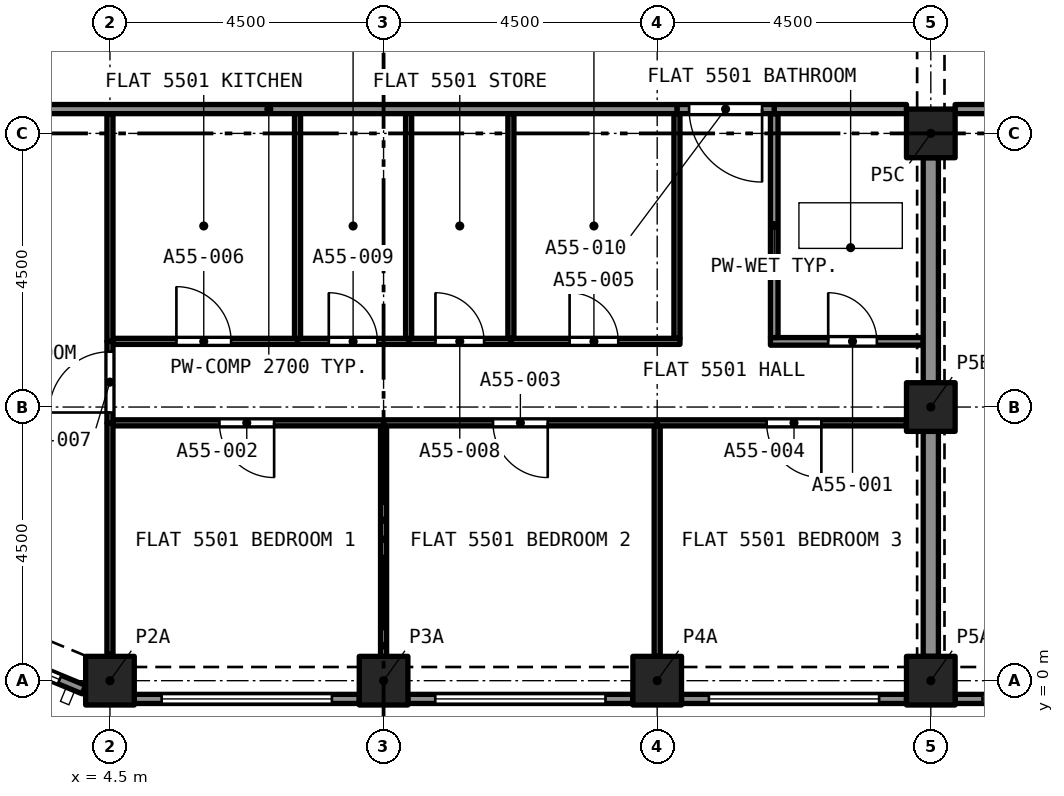
"""IFC4 building model, lengths in metres.
Left out: names, types, materials, properties, quantities, classifications, styles, units other than length and angle.
Written with IfcOpenShell. Run it as: python <this file> out.ifc"""

import sys

from ifc_helpers import new_model, si_unit, direction, frame, frame_2d, origin, origin_2d, place, context, subcontext, project, spatial, rectangle, extrude, element, fill, save


model = new_model("IFC4")
c1 = context("Model", 3, precision=1e-05, world=origin(), true_north=direction((0.0, 1.0)))
c2 = subcontext(c1, "Body", "Model", "MODEL_VIEW")
j1 = project(units=[si_unit("LENGTHUNIT", "METRE"), si_unit("PLANEANGLEUNIT", "RADIAN")], contexts=[c1])
p1 = place(None, origin())
s1 = spatial("IfcSite", under=j1, at=p1, CompositionType="ELEMENT")
p2 = place(p1, origin())
s2 = spatial("IfcBuilding", under=s1, at=p2, CompositionType="ELEMENT")
p3 = place(p2, frame((0.0, 0.0, 198.7)))
s3 = spatial("IfcBuildingStorey", under=s2, at=p3, CompositionType="ELEMENT", Elevation=198.7)
for number, where, z_axis, x_axis in (
    (1, (4.5, 0.0, 0.0), (0.0, 0.0, 1.0), (1.0, 0.0, 0.0)),
    (2, (9.0, 0.0, 0.0), (0.0, 0.0, 1.0), (1.0, 0.0, 0.0)),
    (3, (13.5, 0.0, 0.0), (0.0, 0.0, 1.0), (1.0, 0.0, 0.0)),
    (4, (18.0, 0.0, 0.0), (0.0, 0.0, 1.0), (1.0, 0.0, 0.0)),
    (5, (18.0, 4.5, 0.0), (0.0, 0.0, 1.0), (1.0, 0.0, 0.0)),
    (6, (18.0, 9.0, 0.0), (0.0, 0.0, 1.0), (1.0, 0.0, 0.0)),
):
    element("IfcColumn", number, at=place(p3, frame(where, z_axis=z_axis, x_axis=x_axis)), inside=s3, PredefinedType="COLUMN", context=c2, shape_type="SweptSolid", body=[
        extrude(rectangle(XDim=0.8, YDim=0.8, at=origin_2d()), origin(), (0.0, 0.0, 1.0), 3.2),
    ])
p4 = place(p3, frame((4.071, -0.147, 0.0), z_axis=(0.0, 0.0, 1.0), x_axis=(-0.923885342263, 0.382669406082, 0.0)))
e7 = element("IfcWall", 7, at=p4, inside=s3, PredefinedType="SOLIDWALL", context=c2, shape_type="SweptSolid", body=[
    extrude(rectangle(XDim=2.602, YDim=0.15, at=frame_2d((1.301, 0.0))), origin(), (0.0, 0.0, 1.0), 3.2),
])
p5 = place(p4, frame((0.432, 0.0, 0.45)))
e8 = element("IfcOpeningElement", 8, at=p5, cuts=e7, PredefinedType="OPENING", context=c2, shape_type="SweptSolid", body=[
    extrude(rectangle(XDim=1.9, YDim=1.95, at=frame_2d((0.95, 0.975))), frame((0.0, 0.085, 0.0), z_axis=(0.0, -1.0, 0.0), x_axis=(1.0, 0.0, 0.0)), (0.0, 0.0, 1.0), 0.17),
])
p6 = place(p3, frame((8.6, -0.3, 0.0), z_axis=(0.0, 0.0, 1.0), x_axis=(-1.0, 0.0, 0.0)))
e9 = element("IfcWall", 9, at=p6, inside=s3, PredefinedType="SOLIDWALL", context=c2, shape_type="SweptSolid", body=[
    extrude(rectangle(XDim=3.7, YDim=0.15, at=frame_2d((1.85, 0.0))), origin(), (0.0, 0.0, 1.0), 3.2),
])
p7 = place(p6, frame((0.45, 0.0, 0.45)))
e10 = element("IfcOpeningElement", 10, at=p7, cuts=e9, PredefinedType="OPENING", context=c2, shape_type="SweptSolid", body=[
    extrude(rectangle(XDim=2.8, YDim=1.95, at=frame_2d((1.4, 0.975))), frame((0.0, 0.085, 0.0), z_axis=(0.0, -1.0, 0.0), x_axis=(1.0, 0.0, 0.0)), (0.0, 0.0, 1.0), 0.17),
])
p8 = place(p3, frame((13.1, -0.3, 0.0), z_axis=(0.0, 0.0, 1.0), x_axis=(-1.0, 0.0, 0.0)))
e11 = element("IfcWall", 11, at=p8, inside=s3, PredefinedType="SOLIDWALL", context=c2, shape_type="SweptSolid", body=[
    extrude(rectangle(XDim=3.7, YDim=0.15, at=frame_2d((1.85, 0.0))), origin(), (0.0, 0.0, 1.0), 3.2),
])
p9 = place(p8, frame((0.45, 0.0, 0.45)))
e12 = element("IfcOpeningElement", 12, at=p9, cuts=e11, PredefinedType="OPENING", context=c2, shape_type="SweptSolid", body=[
    extrude(rectangle(XDim=2.8, YDim=1.95, at=frame_2d((1.4, 0.975))), frame((0.0, 0.085, 0.0), z_axis=(0.0, -1.0, 0.0), x_axis=(1.0, 0.0, 0.0)), (0.0, 0.0, 1.0), 0.17),
])
p10 = place(p3, frame((17.6, -0.3, 0.0), z_axis=(0.0, 0.0, 1.0), x_axis=(-1.0, 0.0, 0.0)))
e13 = element("IfcWall", 13, at=p10, inside=s3, PredefinedType="SOLIDWALL", context=c2, shape_type="SweptSolid", body=[
    extrude(rectangle(XDim=3.7, YDim=0.15, at=frame_2d((1.85, 0.0))), origin(), (0.0, 0.0, 1.0), 3.2),
])
p11 = place(p10, frame((0.45, 0.0, 0.45)))
e14 = element("IfcOpeningElement", 14, at=p11, cuts=e13, PredefinedType="OPENING", context=c2, shape_type="SweptSolid", body=[
    extrude(rectangle(XDim=2.8, YDim=1.95, at=frame_2d((1.4, 0.975))), frame((0.0, 0.085, 0.0), z_axis=(0.0, -1.0, 0.0), x_axis=(1.0, 0.0, 0.0)), (0.0, 0.0, 1.0), 0.17),
])
p12 = place(p3, frame((22.1, -0.3, 0.0), z_axis=(0.0, 0.0, 1.0), x_axis=(-1.0, 0.0, 0.0)))
e15 = element("IfcWall", 15, at=p12, inside=s3, PredefinedType="SOLIDWALL", context=c2, shape_type="SweptSolid", body=[
    extrude(rectangle(XDim=3.7, YDim=0.15, at=frame_2d((1.85, 0.0))), origin(), (0.0, 0.0, 1.0), 3.2),
])
p13 = place(p12, frame((0.45, 0.0, 0.45)))
e16 = element("IfcOpeningElement", 16, at=p13, cuts=e15, PredefinedType="OPENING", context=c2, shape_type="SweptSolid", body=[
    extrude(rectangle(XDim=2.8, YDim=1.95, at=frame_2d((1.4, 0.975))), frame((0.0, 0.085, 0.0), z_axis=(0.0, -1.0, 0.0), x_axis=(1.0, 0.0, 0.0)), (0.0, 0.0, 1.0), 0.17),
])
p14 = place(p3, frame((15.363, 5.58, 0.0), z_axis=(0.0, 0.0, 1.0), x_axis=(1.0, 0.0, 0.0)))
e17 = element("IfcWall", 17, at=p14, inside=s3, PredefinedType="PARTITIONING", context=c2, shape_type="SweptSolid", body=[
    extrude(rectangle(XDim=2.512, YDim=0.125, at=frame_2d((1.256, 0.0))), origin(), (0.0, 0.0, 1.0), 2.7),
])
p15 = place(p14, frame((0.95, 0.0, 0.0)))
e18 = element("IfcOpeningElement", 18, at=p15, cuts=e17, PredefinedType="OPENING", context=c2, shape_type="SweptSolid", body=[
    extrude(rectangle(XDim=0.8, YDim=2.1, at=frame_2d((0.4, 1.05))), frame((0.0, 0.073, 0.0), z_axis=(0.0, -1.0, 0.0), x_axis=(1.0, 0.0, 0.0)), (0.0, 0.0, 1.0), 0.145),
])
p16 = place(p3, frame((15.425, 5.643, 0.0), z_axis=(0.0, 0.0, 1.0), x_axis=(0.0, 1.0, 0.0)))
e19 = element("IfcWall", 19, at=p16, inside=s3, PredefinedType="PARTITIONING", context=c2, shape_type="SweptSolid", body=[
    extrude(rectangle(XDim=3.682, YDim=0.125, at=frame_2d((1.841, 0.0))), origin(), (0.0, 0.0, 1.0), 2.7),
])
p17 = place(p3, frame((15.425, 9.4, 0.0), z_axis=(0.0, 0.0, 1.0), x_axis=(1.0, 0.0, 0.0)))
e20 = element("IfcWall", 20, at=p17, inside=s3, PredefinedType="PARTITIONING", context=c2, shape_type="SweptSolid", body=[
    extrude(rectangle(XDim=2.175, YDim=0.15, at=frame_2d((1.087, 0.0))), origin(), (0.0, 0.0, 1.0), 2.7),
])
p18 = place(p3, frame((9.0, 0.4, 0.0), z_axis=(0.0, 0.0, 1.0), x_axis=(0.0, 1.0, 0.0)))
e21 = element("IfcWall", 21, at=p18, inside=s3, PredefinedType="PARTITIONING", context=c2, shape_type="SweptSolid", body=[
    extrude(rectangle(XDim=3.79, YDim=0.1, at=frame_2d((1.895, 0.0))), origin(), (0.0, 0.0, 1.0), 2.7),
])
p19 = place(p3, frame((9.0, 4.24, 0.0), z_axis=(0.0, 0.0, 1.0), x_axis=(-1.0, 0.0, 0.0)))
e22 = element("IfcWall", 22, at=p19, inside=s3, PredefinedType="PARTITIONING", context=c2, shape_type="SweptSolid", body=[
    extrude(rectangle(XDim=4.45, YDim=0.1, at=frame_2d((2.225, 0.0))), origin(), (0.0, 0.0, 1.0), 2.7),
])
p20 = place(p19, frame((1.8, 0.0, 0.0)))
e23 = element("IfcOpeningElement", 23, at=p20, cuts=e22, PredefinedType="OPENING", context=c2, shape_type="SweptSolid", body=[
    extrude(rectangle(XDim=0.9, YDim=2.1, at=frame_2d((0.45, 1.05))), frame((0.0, 0.06, 0.0), z_axis=(0.0, -1.0, 0.0), x_axis=(1.0, 0.0, 0.0)), (0.0, 0.0, 1.0), 0.12),
])
p21 = place(p3, frame((4.5, 0.433, 0.0), z_axis=(0.0, 0.0, 1.0), x_axis=(0.0, 1.0, 0.0)))
e24 = element("IfcWall", 24, at=p21, inside=s3, PredefinedType="PARTITIONING", context=c2, shape_type="SweptSolid", body=[
    extrude(rectangle(XDim=3.807, YDim=0.1, at=frame_2d((1.904, 0.0))), origin(), (0.0, 0.0, 1.0), 2.7),
])
p22 = place(p3, frame((13.5, 0.4, 0.0), z_axis=(0.0, 0.0, 1.0), x_axis=(0.0, 1.0, 0.0)))
e25 = element("IfcWall", 25, at=p22, inside=s3, PredefinedType="PARTITIONING", context=c2, shape_type="SweptSolid", body=[
    extrude(rectangle(XDim=3.79, YDim=0.1, at=frame_2d((1.895, 0.0))), origin(), (0.0, 0.0, 1.0), 2.7),
])
p23 = place(p3, frame((13.5, 4.24, 0.0), z_axis=(0.0, 0.0, 1.0), x_axis=(-1.0, 0.0, 0.0)))
e26 = element("IfcWall", 26, at=p23, inside=s3, PredefinedType="PARTITIONING", context=c2, shape_type="SweptSolid", body=[
    extrude(rectangle(XDim=4.5, YDim=0.1, at=frame_2d((2.25, 0.0))), origin(), (0.0, 0.0, 1.0), 2.7),
])
p24 = place(p23, frame((1.8, 0.0, 0.0)))
e27 = element("IfcOpeningElement", 27, at=p24, cuts=e26, PredefinedType="OPENING", context=c2, shape_type="SweptSolid", body=[
    extrude(rectangle(XDim=0.9, YDim=2.1, at=frame_2d((0.45, 1.05))), frame((0.0, 0.06, 0.0), z_axis=(0.0, -1.0, 0.0), x_axis=(1.0, 0.0, 0.0)), (0.0, 0.0, 1.0), 0.12),
])
p25 = place(p3, frame((17.6, 4.24, 0.0), z_axis=(0.0, 0.0, 1.0), x_axis=(-1.0, 0.0, 0.0)))
e28 = element("IfcWall", 28, at=p25, inside=s3, PredefinedType="PARTITIONING", context=c2, shape_type="SweptSolid", body=[
    extrude(rectangle(XDim=4.1, YDim=0.1, at=frame_2d((2.05, 0.0))), origin(), (0.0, 0.0, 1.0), 2.7),
])
p26 = place(p25, frame((1.4, 0.0, 0.0)))
e29 = element("IfcOpeningElement", 29, at=p26, cuts=e28, PredefinedType="OPENING", context=c2, shape_type="SweptSolid", body=[
    extrude(rectangle(XDim=0.9, YDim=2.1, at=frame_2d((0.45, 1.05))), frame((0.0, 0.06, 0.0), z_axis=(0.0, -1.0, 0.0), x_axis=(1.0, 0.0, 0.0)), (0.0, 0.0, 1.0), 0.12),
])
p27 = place(p3, frame((18.0, 0.4, 0.0), z_axis=(0.0, 0.0, 1.0), x_axis=(0.0, 1.0, 0.0)))
e30 = element("IfcWall", 30, at=p27, inside=s3, PredefinedType="PARTITIONING", context=c2, shape_type="SweptSolid", body=[
    extrude(rectangle(XDim=3.7, YDim=0.25, at=frame_2d((1.85, 0.0))), origin(), (0.0, 0.0, 1.0), 2.38),
])
p28 = place(p3, frame((13.825, 5.63, 0.0), z_axis=(0.0, 0.0, 1.0), x_axis=(0.0, 1.0, 0.0)))
e31 = element("IfcWall", 31, at=p28, inside=s3, PredefinedType="PARTITIONING", context=c2, shape_type="SweptSolid", body=[
    extrude(rectangle(XDim=3.695, YDim=0.1, at=frame_2d((1.848, 0.0))), origin(), (0.0, 0.0, 1.0), 2.7),
])
p29 = place(p3, frame((11.094, 5.58, 0.0), z_axis=(0.0, 0.0, 1.0), x_axis=(1.0, 0.0, 0.0)))
e32 = element("IfcWall", 32, at=p29, inside=s3, PredefinedType="PARTITIONING", context=c2, shape_type="SweptSolid", body=[
    extrude(rectangle(XDim=2.781, YDim=0.1, at=frame_2d((1.391, 0.0))), origin(), (0.0, 0.0, 1.0), 2.7),
])
p30 = place(p29, frame((0.966, 0.0, 0.0)))
e33 = element("IfcOpeningElement", 33, at=p30, cuts=e32, PredefinedType="OPENING", context=c2, shape_type="SweptSolid", body=[
    extrude(rectangle(XDim=0.8, YDim=2.1, at=frame_2d((0.4, 1.05))), frame((0.0, 0.06, 0.0), z_axis=(0.0, -1.0, 0.0), x_axis=(1.0, 0.0, 0.0)), (0.0, 0.0, 1.0), 0.12),
])
p31 = place(p3, frame((11.094, 5.63, 0.0), z_axis=(0.0, 0.0, 1.0), x_axis=(0.0, 1.0, 0.0)))
e34 = element("IfcWall", 34, at=p31, inside=s3, PredefinedType="PARTITIONING", context=c2, shape_type="SweptSolid", body=[
    extrude(rectangle(XDim=3.695, YDim=0.1, at=frame_2d((1.848, 0.0))), origin(), (0.0, 0.0, 1.0), 2.7),
])
p32 = place(p3, frame((4.55, 5.58, 0.0), z_axis=(0.0, 0.0, 1.0), x_axis=(1.0, 0.0, 0.0)))
e35 = element("IfcWall", 35, at=p32, inside=s3, PredefinedType="PARTITIONING", context=c2, shape_type="SweptSolid", body=[
    extrude(rectangle(XDim=3.035, YDim=0.1, at=frame_2d((1.518, 0.0))), origin(), (0.0, 0.0, 1.0), 2.7),
])
p33 = place(p32, frame((1.043, 0.0, 0.0)))
e36 = element("IfcOpeningElement", 36, at=p33, cuts=e35, PredefinedType="OPENING", context=c2, shape_type="SweptSolid", body=[
    extrude(rectangle(XDim=0.9, YDim=2.1, at=frame_2d((0.45, 1.05))), frame((0.0, 0.06, 0.0), z_axis=(0.0, -1.0, 0.0), x_axis=(1.0, 0.0, 0.0)), (0.0, 0.0, 1.0), 0.12),
])
p34 = place(p3, frame((4.5, 4.24, 0.0), z_axis=(0.0, 0.0, 1.0), x_axis=(0.0, 1.0, 0.0)))
e37 = element("IfcWall", 37, at=p34, inside=s3, PredefinedType="PARTITIONING", context=c2, shape_type="SweptSolid", body=[
    extrude(rectangle(XDim=1.34, YDim=0.1, at=frame_2d((0.67, 0.0))), origin(), (0.0, 0.0, 1.0), 2.7),
])
p35 = place(p34, frame((0.17, 0.0, 0.0)))
e38 = element("IfcOpeningElement", 38, at=p35, cuts=e37, PredefinedType="OPENING", context=c2, shape_type="SweptSolid", body=[
    extrude(rectangle(XDim=1.0, YDim=2.1, at=frame_2d((0.5, 1.05))), frame((0.0, 0.06, 0.0), z_axis=(0.0, -1.0, 0.0), x_axis=(1.0, 0.0, 0.0)), (0.0, 0.0, 1.0), 0.12),
])
p36 = place(p3, frame((9.412, 5.58, 0.0), z_axis=(0.0, 0.0, 1.0), x_axis=(1.0, 0.0, 0.0)))
e39 = element("IfcWall", 39, at=p36, inside=s3, PredefinedType="PARTITIONING", context=c2, shape_type="SweptSolid", body=[
    extrude(rectangle(XDim=1.682, YDim=0.1, at=frame_2d((0.841, 0.0))), origin(), (0.0, 0.0, 1.0), 2.7),
])
p37 = place(p36, frame((0.441, 0.0, 0.0)))
e40 = element("IfcOpeningElement", 40, at=p37, cuts=e39, PredefinedType="OPENING", context=c2, shape_type="SweptSolid", body=[
    extrude(rectangle(XDim=0.8, YDim=2.1, at=frame_2d((0.4, 1.05))), frame((0.0, 0.06, 0.0), z_axis=(0.0, -1.0, 0.0), x_axis=(1.0, 0.0, 0.0)), (0.0, 0.0, 1.0), 0.12),
])
p38 = place(p3, frame((7.585, 5.58, 0.0), z_axis=(0.0, 0.0, 1.0), x_axis=(1.0, 0.0, 0.0)))
e41 = element("IfcWall", 41, at=p38, inside=s3, PredefinedType="PARTITIONING", context=c2, shape_type="SweptSolid", body=[
    extrude(rectangle(XDim=1.827, YDim=0.1, at=frame_2d((0.914, 0.0))), origin(), (0.0, 0.0, 1.0), 2.7),
])
p39 = place(p38, frame((0.513, 0.0, 0.0)))
e42 = element("IfcOpeningElement", 42, at=p39, cuts=e41, PredefinedType="OPENING", context=c2, shape_type="SweptSolid", body=[
    extrude(rectangle(XDim=0.8, YDim=2.1, at=frame_2d((0.4, 1.05))), frame((0.0, 0.06, 0.0), z_axis=(0.0, -1.0, 0.0), x_axis=(1.0, 0.0, 0.0)), (0.0, 0.0, 1.0), 0.12),
])
p40 = place(p3, frame((18.0, 4.9, 0.0), z_axis=(0.0, 0.0, 1.0), x_axis=(0.0, 1.0, 0.0)))
e43 = element("IfcWall", 43, at=p40, inside=s3, PredefinedType="PARTITIONING", context=c2, shape_type="SweptSolid", body=[
    extrude(rectangle(XDim=3.7, YDim=0.25, at=frame_2d((1.85, 0.0))), origin(), (0.0, 0.0, 1.0), 2.38),
])
p41 = place(p3, frame((15.425, 9.4, 0.0), z_axis=(0.0, 0.0, 1.0), x_axis=(-1.0, 0.0, 0.0)))
e44 = element("IfcWall", 44, at=p41, inside=s3, PredefinedType="PARTITIONING", context=c2, shape_type="SweptSolid", body=[
    extrude(rectangle(XDim=1.6, YDim=0.15, at=frame_2d((0.8, 0.0))), origin(), (0.0, 0.0, 1.0), 2.7),
])
p42 = place(p41, frame((0.2, 0.0, 0.0)))
e45 = element("IfcOpeningElement", 45, at=p42, cuts=e44, PredefinedType="OPENING", context=c2, shape_type="SweptSolid", body=[
    extrude(rectangle(XDim=1.2, YDim=2.4, at=frame_2d((0.6, 1.2))), frame((0.0, 0.085, 0.0), z_axis=(0.0, -1.0, 0.0), x_axis=(1.0, 0.0, 0.0)), (0.0, 0.0, 1.0), 0.17),
])
p43 = place(p3, frame((4.5, 5.58, 0.0), z_axis=(0.0, 0.0, 1.0), x_axis=(0.0, 1.0, 0.0)))
e46 = element("IfcWall", 46, at=p43, inside=s3, PredefinedType="PARTITIONING", context=c2, shape_type="SweptSolid", body=[
    extrude(rectangle(XDim=3.745, YDim=0.1, at=frame_2d((1.873, 0.0))), origin(), (0.0, 0.0, 1.0), 2.7),
])
p44 = place(p3, frame((7.585, 5.63, 0.0), z_axis=(0.0, 0.0, 1.0), x_axis=(0.0, 1.0, 0.0)))
e47 = element("IfcWall", 47, at=p44, inside=s3, PredefinedType="PARTITIONING", context=c2, shape_type="SweptSolid", body=[
    extrude(rectangle(XDim=3.695, YDim=0.1, at=frame_2d((1.848, 0.0))), origin(), (0.0, 0.0, 1.0), 2.7),
])
p45 = place(p3, frame((0.4, 9.4, 0.0), z_axis=(0.0, 0.0, 1.0), x_axis=(1.0, 0.0, 0.0)))
e48 = element("IfcWall", 48, at=p45, inside=s3, PredefinedType="PARTITIONING", context=c2, shape_type="SweptSolid", body=[
    extrude(rectangle(XDim=13.425, YDim=0.15, at=frame_2d((6.712, 0.0))), origin(), (0.0, 0.0, 1.0), 2.7),
])
p46 = place(p3, frame((9.412, 5.63, 0.0), z_axis=(0.0, 0.0, 1.0), x_axis=(0.0, 1.0, 0.0)))
e49 = element("IfcWall", 49, at=p46, inside=s3, PredefinedType="PARTITIONING", context=c2, shape_type="SweptSolid", body=[
    extrude(rectangle(XDim=3.695, YDim=0.1, at=frame_2d((1.848, 0.0))), origin(), (0.0, 0.0, 1.0), 2.7),
])
p47 = place(p3, frame((27.0, 9.4, 0.0), z_axis=(0.0, 0.0, 1.0), x_axis=(-1.0, 0.0, 0.0)))
e50 = element("IfcWall", 50, at=p47, inside=s3, PredefinedType="PARTITIONING", context=c2, shape_type="SweptSolid", body=[
    extrude(rectangle(XDim=8.6, YDim=0.15, at=frame_2d((4.3, 0.0))), origin(), (0.0, 0.0, 1.0), 2.7),
])
p48 = place(p47, frame((4.0, 0.0, 0.0)))
e51 = element("IfcOpeningElement", 51, at=p48, cuts=e50, PredefinedType="OPENING", context=c2, shape_type="SweptSolid", body=[
    extrude(rectangle(XDim=1.0, YDim=2.1, at=frame_2d((0.5, 1.05))), frame((0.0, 0.085, 0.0), z_axis=(0.0, -1.0, 0.0), x_axis=(1.0, 0.0, 0.0)), (0.0, 0.0, 1.0), 0.17),
])
p49 = place(p5, origin())
e52 = element("IfcWindow", 52, at=p49, inside=s3, PartitioningType="SINGLE_PANEL", PredefinedType="WINDOW", context=c2, shape_type="SweptSolid", body=[
    extrude(rectangle(XDim=1.9, YDim=1.95, at=frame_2d((0.95, 0.975))), frame((0.0, 0.03, 0.0), z_axis=(0.0, -1.0, 0.0), x_axis=(1.0, 0.0, 0.0)), (0.0, 0.0, 1.0), 0.06),
])
fill(e8, e52)
p50 = place(p7, origin())
e53 = element("IfcWindow", 53, at=p50, inside=s3, PartitioningType="SINGLE_PANEL", PredefinedType="WINDOW", context=c2, shape_type="SweptSolid", body=[
    extrude(rectangle(XDim=2.8, YDim=1.95, at=frame_2d((1.4, 0.975))), frame((0.0, 0.03, 0.0), z_axis=(0.0, -1.0, 0.0), x_axis=(1.0, 0.0, 0.0)), (0.0, 0.0, 1.0), 0.06),
])
fill(e10, e53)
p51 = place(p9, origin())
e54 = element("IfcWindow", 54, at=p51, inside=s3, PartitioningType="SINGLE_PANEL", PredefinedType="WINDOW", context=c2, shape_type="SweptSolid", body=[
    extrude(rectangle(XDim=2.8, YDim=1.95, at=frame_2d((1.4, 0.975))), frame((0.0, 0.03, 0.0), z_axis=(0.0, -1.0, 0.0), x_axis=(1.0, 0.0, 0.0)), (0.0, 0.0, 1.0), 0.06),
])
fill(e12, e54)
p52 = place(p11, origin())
e55 = element("IfcWindow", 55, at=p52, inside=s3, PartitioningType="SINGLE_PANEL", PredefinedType="WINDOW", context=c2, shape_type="SweptSolid", body=[
    extrude(rectangle(XDim=2.8, YDim=1.95, at=frame_2d((1.4, 0.975))), frame((0.0, 0.03, 0.0), z_axis=(0.0, -1.0, 0.0), x_axis=(1.0, 0.0, 0.0)), (0.0, 0.0, 1.0), 0.06),
])
fill(e14, e55)
p53 = place(p13, origin())
e56 = element("IfcWindow", 56, at=p53, inside=s3, PartitioningType="SINGLE_PANEL", PredefinedType="WINDOW", context=c2, shape_type="SweptSolid", body=[
    extrude(rectangle(XDim=2.8, YDim=1.95, at=frame_2d((1.4, 0.975))), frame((0.0, 0.03, 0.0), z_axis=(0.0, -1.0, 0.0), x_axis=(1.0, 0.0, 0.0)), (0.0, 0.0, 1.0), 0.06),
])
fill(e16, e56)
p54 = place(p15, origin())
e57 = element("IfcDoor", 57, at=p54, inside=s3, OperationType="SINGLE_SWING_RIGHT", PredefinedType="DOOR", context=c2, shape_type="SweptSolid", body=[
    extrude(rectangle(XDim=0.8, YDim=2.1, at=frame_2d((0.4, 1.05))), frame((0.0, 0.025, 0.0), z_axis=(0.0, -1.0, 0.0), x_axis=(1.0, 0.0, 0.0)), (0.0, 0.0, 1.0), 0.05),
])
fill(e18, e57)
p55 = place(p20, origin())
e58 = element("IfcDoor", 58, at=p55, inside=s3, OperationType="SINGLE_SWING_RIGHT", PredefinedType="DOOR", context=c2, shape_type="SweptSolid", body=[
    extrude(rectangle(XDim=0.9, YDim=2.1, at=frame_2d((0.45, 1.05))), frame((0.0, 0.025, 0.0), z_axis=(0.0, -1.0, 0.0), x_axis=(1.0, 0.0, 0.0)), (0.0, 0.0, 1.0), 0.05),
])
fill(e23, e58)
p56 = place(p24, origin())
e59 = element("IfcDoor", 59, at=p56, inside=s3, OperationType="SINGLE_SWING_LEFT", PredefinedType="DOOR", context=c2, shape_type="SweptSolid", body=[
    extrude(rectangle(XDim=0.9, YDim=2.1, at=frame_2d((0.45, 1.05))), frame((0.0, 0.025, 0.0), z_axis=(0.0, -1.0, 0.0), x_axis=(1.0, 0.0, 0.0)), (0.0, 0.0, 1.0), 0.05),
])
fill(e27, e59)
p57 = place(p26, origin())
e60 = element("IfcDoor", 60, at=p57, inside=s3, OperationType="SINGLE_SWING_LEFT", PredefinedType="DOOR", context=c2, shape_type="SweptSolid", body=[
    extrude(rectangle(XDim=0.9, YDim=2.1, at=frame_2d((0.45, 1.05))), frame((0.0, 0.025, 0.0), z_axis=(0.0, -1.0, 0.0), x_axis=(1.0, 0.0, 0.0)), (0.0, 0.0, 1.0), 0.05),
])
fill(e29, e60)
p58 = place(p30, origin())
e61 = element("IfcDoor", 61, at=p58, inside=s3, OperationType="SINGLE_SWING_LEFT", PredefinedType="DOOR", context=c2, shape_type="SweptSolid", body=[
    extrude(rectangle(XDim=0.8, YDim=2.1, at=frame_2d((0.4, 1.05))), frame((0.0, 0.025, 0.0), z_axis=(0.0, -1.0, 0.0), x_axis=(1.0, 0.0, 0.0)), (0.0, 0.0, 1.0), 0.05),
])
fill(e33, e61)
p59 = place(p33, origin())
e62 = element("IfcDoor", 62, at=p59, inside=s3, OperationType="SINGLE_SWING_LEFT", PredefinedType="DOOR", context=c2, shape_type="SweptSolid", body=[
    extrude(rectangle(XDim=0.9, YDim=2.1, at=frame_2d((0.45, 1.05))), frame((0.0, 0.025, 0.0), z_axis=(0.0, -1.0, 0.0), x_axis=(1.0, 0.0, 0.0)), (0.0, 0.0, 1.0), 0.05),
])
fill(e36, e62)
p60 = place(p35, origin())
e63 = element("IfcDoor", 63, at=p60, inside=s3, OperationType="SINGLE_SWING_RIGHT", PredefinedType="DOOR", context=c2, shape_type="SweptSolid", body=[
    extrude(rectangle(XDim=1.0, YDim=2.1, at=frame_2d((0.5, 1.05))), frame((0.0, 0.025, 0.0), z_axis=(0.0, -1.0, 0.0), x_axis=(1.0, 0.0, 0.0)), (0.0, 0.0, 1.0), 0.05),
])
fill(e38, e63)
p61 = place(p37, origin())
e64 = element("IfcDoor", 64, at=p61, inside=s3, OperationType="SINGLE_SWING_LEFT", PredefinedType="DOOR", context=c2, shape_type="SweptSolid", body=[
    extrude(rectangle(XDim=0.8, YDim=2.1, at=frame_2d((0.4, 1.05))), frame((0.0, 0.025, 0.0), z_axis=(0.0, -1.0, 0.0), x_axis=(1.0, 0.0, 0.0)), (0.0, 0.0, 1.0), 0.05),
])
fill(e40, e64)
p62 = place(p39, origin())
e65 = element("IfcDoor", 65, at=p62, inside=s3, OperationType="SINGLE_SWING_LEFT", PredefinedType="DOOR", context=c2, shape_type="SweptSolid", body=[
    extrude(rectangle(XDim=0.8, YDim=2.1, at=frame_2d((0.4, 1.05))), frame((0.0, 0.025, 0.0), z_axis=(0.0, -1.0, 0.0), x_axis=(1.0, 0.0, 0.0)), (0.0, 0.0, 1.0), 0.05),
])
fill(e42, e65)
p63 = place(p42, origin())
e66 = element("IfcDoor", 66, at=p63, inside=s3, OperationType="SINGLE_SWING_LEFT", PredefinedType="DOOR", context=c2, shape_type="SweptSolid", body=[
    extrude(rectangle(XDim=1.2, YDim=2.4, at=frame_2d((0.6, 1.2))), frame((0.0, 0.025, 0.0), z_axis=(0.0, -1.0, 0.0), x_axis=(1.0, 0.0, 0.0)), (0.0, 0.0, 1.0), 0.05),
])
fill(e45, e66)
save(model, sys.argv[1])
